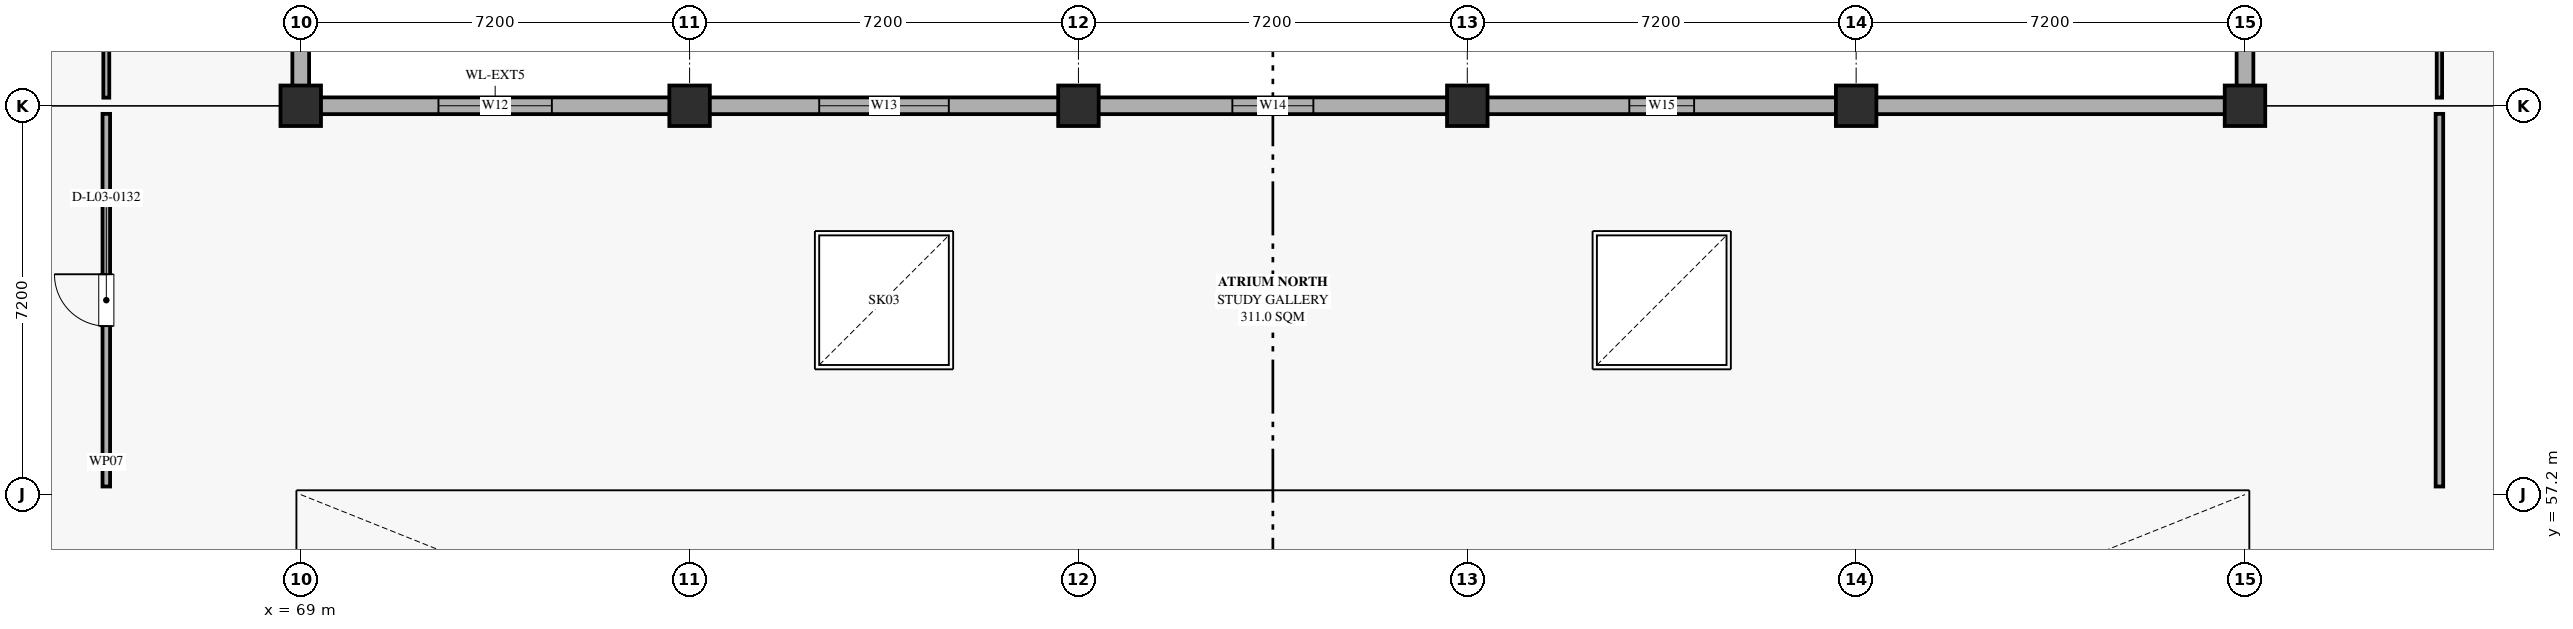
"""IFC4 building model, lengths in metres.
Left out: names, types, materials, properties, quantities, classifications, styles, units other than length and angle.
Written with IfcOpenShell. Run it as: python <this file> out.ifc"""

import sys

from ifc_helpers import new_model, si_unit, direction, frame, frame_2d, origin, origin_2d, place, context, subcontext, project, spatial, rectangle, extrude, element, fill, save


model = new_model("IFC4")
c1 = context("Model", 3, precision=1e-05, world=origin(), true_north=direction((0.0, 1.0)))
c2 = subcontext(c1, "Body", "Model", "MODEL_VIEW")
j1 = project(units=[si_unit("LENGTHUNIT", "METRE"), si_unit("PLANEANGLEUNIT", "RADIAN")], contexts=[c1])
p1 = place(None, origin())
s1 = spatial("IfcSite", under=j1, at=p1, CompositionType="ELEMENT")
p2 = place(p1, origin())
s2 = spatial("IfcBuilding", under=s1, at=p2, CompositionType="ELEMENT")
p3 = place(p2, frame((0.0, 0.0, 15.12)))
s3 = spatial("IfcBuildingStorey", under=s2, at=p3, CompositionType="ELEMENT", Elevation=15.12)
for number, where, z_axis, x_axis in (
    (1, (69.0, 64.4, 0.0), (0.0, 0.0, 1.0), (1.0, 0.0, 0.0)),
    (2, (76.2, 64.4, 0.0), (0.0, 0.0, 1.0), (1.0, 0.0, 0.0)),
    (3, (83.4, 64.4, 0.0), (0.0, 0.0, 1.0), (1.0, 0.0, 0.0)),
    (4, (90.6, 64.4, 0.0), (0.0, 0.0, 1.0), (1.0, 0.0, 0.0)),
    (5, (97.8, 64.4, 0.0), (0.0, 0.0, 1.0), (1.0, 0.0, 0.0)),
    (6, (105.0, 64.4, 0.0), (0.0, 0.0, 1.0), (1.0, 0.0, 0.0)),
):
    element("IfcColumn", number, at=place(p3, frame(where, z_axis=z_axis, x_axis=x_axis)), inside=s3, PredefinedType="COLUMN", context=c2, shape_type="SweptSolid", body=[
        extrude(rectangle(XDim=0.75, YDim=0.75, at=origin_2d()), origin(), (0.0, 0.0, 1.0), 4.68),
    ])
p4 = place(p3, frame((69.36, 64.4, 0.0), z_axis=(0.0, 0.0, 1.0), x_axis=(1.0, 0.0, 0.0)))
e7 = element("IfcWall", 7, at=p4, inside=s3, PredefinedType="SOLIDWALL", context=c2, shape_type="SweptSolid", body=[
    extrude(rectangle(XDim=6.48, YDim=0.31, at=frame_2d((3.24, 0.0))), origin(), (0.0, 0.0, 1.0), 3.18),
])
p5 = place(p4, frame((2.19, 0.0, 0.85)))
e8 = element("IfcOpeningElement", 8, at=p5, cuts=e7, PredefinedType="OPENING", context=c2, shape_type="SweptSolid", body=[
    extrude(rectangle(XDim=2.1, YDim=1.8, at=frame_2d((1.05, 0.9))), frame((0.0, 0.165, 0.0), z_axis=(0.0, -1.0, 0.0), x_axis=(1.0, 0.0, 0.0)), (0.0, 0.0, 1.0), 0.33),
])
p6 = place(p3, frame((76.56, 64.4, 0.0), z_axis=(0.0, 0.0, 1.0), x_axis=(1.0, 0.0, 0.0)))
e9 = element("IfcWall", 9, at=p6, inside=s3, PredefinedType="SOLIDWALL", context=c2, shape_type="SweptSolid", body=[
    extrude(rectangle(XDim=6.48, YDim=0.31, at=frame_2d((3.24, 0.0))), origin(), (0.0, 0.0, 1.0), 3.18),
])
p7 = place(p6, frame((2.04, 0.0, 0.85)))
e10 = element("IfcOpeningElement", 10, at=p7, cuts=e9, PredefinedType="OPENING", context=c2, shape_type="SweptSolid", body=[
    extrude(rectangle(XDim=2.4, YDim=1.8, at=frame_2d((1.2, 0.9))), frame((0.0, 0.165, 0.0), z_axis=(0.0, -1.0, 0.0), x_axis=(1.0, 0.0, 0.0)), (0.0, 0.0, 1.0), 0.33),
])
p8 = place(p3, frame((83.76, 64.4, 0.0), z_axis=(0.0, 0.0, 1.0), x_axis=(1.0, 0.0, 0.0)))
e11 = element("IfcWall", 11, at=p8, inside=s3, PredefinedType="SOLIDWALL", context=c2, shape_type="SweptSolid", body=[
    extrude(rectangle(XDim=6.48, YDim=0.31, at=frame_2d((3.24, 0.0))), origin(), (0.0, 0.0, 1.0), 3.18),
])
p9 = place(p8, frame((2.49, 0.0, 0.85)))
e12 = element("IfcOpeningElement", 12, at=p9, cuts=e11, PredefinedType="OPENING", context=c2, shape_type="SweptSolid", body=[
    extrude(rectangle(XDim=1.5, YDim=1.8, at=frame_2d((0.75, 0.9))), frame((0.0, 0.165, 0.0), z_axis=(0.0, -1.0, 0.0), x_axis=(1.0, 0.0, 0.0)), (0.0, 0.0, 1.0), 0.33),
])
p10 = place(p3, frame((90.96, 64.4, 0.0), z_axis=(0.0, 0.0, 1.0), x_axis=(1.0, 0.0, 0.0)))
e13 = element("IfcWall", 13, at=p10, inside=s3, PredefinedType="SOLIDWALL", context=c2, shape_type="SweptSolid", body=[
    extrude(rectangle(XDim=6.48, YDim=0.31, at=frame_2d((3.24, 0.0))), origin(), (0.0, 0.0, 1.0), 3.18),
])
p11 = place(p10, frame((2.64, 0.0, 0.85)))
e14 = element("IfcOpeningElement", 14, at=p11, cuts=e13, PredefinedType="OPENING", context=c2, shape_type="SweptSolid", body=[
    extrude(rectangle(XDim=1.2, YDim=1.8, at=frame_2d((0.6, 0.9))), frame((0.0, 0.165, 0.0), z_axis=(0.0, -1.0, 0.0), x_axis=(1.0, 0.0, 0.0)), (0.0, 0.0, 1.0), 0.33),
])
p12 = place(p3, frame((98.16, 64.4, 0.0), z_axis=(0.0, 0.0, 1.0), x_axis=(1.0, 0.0, 0.0)))
e15 = element("IfcWall", 15, at=p12, inside=s3, PredefinedType="SOLIDWALL", context=c2, shape_type="SweptSolid", body=[
    extrude(rectangle(XDim=6.48, YDim=0.31, at=frame_2d((3.24, 0.0))), origin(), (0.0, 0.0, 1.0), 3.18),
])
p13 = place(p3, frame((69.0, 71.24, 0.0), z_axis=(0.0, 0.0, 1.0), x_axis=(0.0, -1.0, 0.0)))
e16 = element("IfcWall", 16, at=p13, inside=s3, PredefinedType="SOLIDWALL", context=c2, shape_type="SweptSolid", body=[
    extrude(rectangle(XDim=6.48, YDim=0.31, at=frame_2d((3.24, 0.0))), origin(), (0.0, 0.0, 1.0), 3.18),
])
p14 = place(p13, frame((2.39, 0.0, 0.85)))
e17 = element("IfcOpeningElement", 17, at=p14, cuts=e16, PredefinedType="OPENING", context=c2, shape_type="SweptSolid", body=[
    extrude(rectangle(XDim=1.7, YDim=2.0, at=frame_2d((0.85, 1.0))), frame((0.0, 0.165, 0.0), z_axis=(0.0, -1.0, 0.0), x_axis=(1.0, 0.0, 0.0)), (0.0, 0.0, 1.0), 0.33),
])
p15 = place(p3, frame((105.0, 64.76, 0.0), z_axis=(0.0, 0.0, 1.0), x_axis=(0.0, 1.0, 0.0)))
e18 = element("IfcWall", 18, at=p15, inside=s3, PredefinedType="SOLIDWALL", context=c2, shape_type="SweptSolid", body=[
    extrude(rectangle(XDim=6.48, YDim=0.31, at=frame_2d((3.24, 0.0))), origin(), (0.0, 0.0, 1.0), 3.18),
])
p16 = place(p15, frame((2.29, 0.0, 0.85)))
e19 = element("IfcOpeningElement", 19, at=p16, cuts=e18, PredefinedType="OPENING", context=c2, shape_type="SweptSolid", body=[
    extrude(rectangle(XDim=1.9, YDim=2.0, at=frame_2d((0.95, 1.0))), frame((0.0, 0.165, 0.0), z_axis=(0.0, -1.0, 0.0), x_axis=(1.0, 0.0, 0.0)), (0.0, 0.0, 1.0), 0.33),
])
p17 = place(p3, frame((65.4, 57.35, 0.0), z_axis=(0.0, 0.0, 1.0), x_axis=(0.0, 1.0, 0.0)))
e20 = element("IfcWall", 20, at=p17, inside=s3, PredefinedType="PARTITIONING", context=c2, shape_type="SweptSolid", body=[
    extrude(rectangle(XDim=6.9, YDim=0.14, at=frame_2d((3.45, 0.0))), origin(), (0.0, 0.0, 1.0), 3.16),
])
p18 = place(p17, frame((2.97, 0.0, 0.0)))
e21 = element("IfcOpeningElement", 21, at=p18, cuts=e20, PredefinedType="OPENING", context=c2, shape_type="SweptSolid", body=[
    extrude(rectangle(XDim=0.96, YDim=2.1, at=frame_2d((0.48, 1.05))), frame((0.0, 0.08, 0.0), z_axis=(0.0, -1.0, 0.0), x_axis=(1.0, 0.0, 0.0)), (0.0, 0.0, 1.0), 0.16),
])
p19 = place(p3, frame((108.6, 64.25, 0.0), z_axis=(0.0, 0.0, 1.0), x_axis=(0.0, -1.0, 0.0)))
e22 = element("IfcWall", 22, at=p19, inside=s3, PredefinedType="PARTITIONING", context=c2, shape_type="SweptSolid", body=[
    extrude(rectangle(XDim=6.9, YDim=0.14, at=frame_2d((3.45, 0.0))), origin(), (0.0, 0.0, 1.0), 3.16),
])
p20 = place(p3, frame((65.4, 64.55, 0.0), z_axis=(0.0, 0.0, 1.0), x_axis=(0.0, 1.0, 0.0)))
e23 = element("IfcWall", 23, at=p20, inside=s3, PredefinedType="PARTITIONING", context=c2, shape_type="SweptSolid", body=[
    extrude(rectangle(XDim=21.3, YDim=0.11, at=frame_2d((10.65, 0.0))), origin(), (0.0, 0.0, 1.0), 3.16),
])
p21 = place(p20, frame((10.17, 0.0, 0.0)))
e24 = element("IfcOpeningElement", 24, at=p21, cuts=e23, PredefinedType="OPENING", context=c2, shape_type="SweptSolid", body=[
    extrude(rectangle(XDim=0.96, YDim=2.16, at=frame_2d((0.48, 1.08))), frame((0.0, 0.065, 0.0), z_axis=(0.0, -1.0, 0.0), x_axis=(1.0, 0.0, 0.0)), (0.0, 0.0, 1.0), 0.13),
])
p22 = place(p3, frame((108.6, 85.85, 0.0), z_axis=(0.0, 0.0, 1.0), x_axis=(0.0, -1.0, 0.0)))
e25 = element("IfcWall", 25, at=p22, inside=s3, PredefinedType="PARTITIONING", context=c2, shape_type="SweptSolid", body=[
    extrude(rectangle(XDim=21.3, YDim=0.1, at=frame_2d((10.65, 0.0))), origin(), (0.0, 0.0, 1.0), 3.16),
])
p23 = place(p22, frame((10.17, 0.0, 0.0)))
e26 = element("IfcOpeningElement", 26, at=p23, cuts=e25, PredefinedType="OPENING", context=c2, shape_type="SweptSolid", body=[
    extrude(rectangle(XDim=0.96, YDim=2.22, at=frame_2d((0.48, 1.11))), frame((0.0, 0.06, 0.0), z_axis=(0.0, -1.0, 0.0), x_axis=(1.0, 0.0, 0.0)), (0.0, 0.0, 1.0), 0.12),
])
p24 = place(p5, origin())
e27 = element("IfcWindow", 27, at=p24, inside=s3, PartitioningType="DOUBLE_PANEL_VERTICAL", PredefinedType="WINDOW", context=c2, shape_type="SweptSolid", body=[
    extrude(rectangle(XDim=2.1, YDim=1.8, at=frame_2d((1.05, 0.9))), frame((0.0, 0.03, 0.0), z_axis=(0.0, -1.0, 0.0), x_axis=(1.0, 0.0, 0.0)), (0.0, 0.0, 1.0), 0.06),
])
fill(e8, e27)
p25 = place(p7, origin())
e28 = element("IfcWindow", 28, at=p25, inside=s3, PartitioningType="DOUBLE_PANEL_VERTICAL", PredefinedType="WINDOW", context=c2, shape_type="SweptSolid", body=[
    extrude(rectangle(XDim=2.4, YDim=1.8, at=frame_2d((1.2, 0.9))), frame((0.0, 0.03, 0.0), z_axis=(0.0, -1.0, 0.0), x_axis=(1.0, 0.0, 0.0)), (0.0, 0.0, 1.0), 0.06),
])
fill(e10, e28)
p26 = place(p9, origin())
e29 = element("IfcWindow", 29, at=p26, inside=s3, PartitioningType="SINGLE_PANEL", PredefinedType="WINDOW", context=c2, shape_type="SweptSolid", body=[
    extrude(rectangle(XDim=1.5, YDim=1.8, at=frame_2d((0.75, 0.9))), frame((0.0, 0.03, 0.0), z_axis=(0.0, -1.0, 0.0), x_axis=(1.0, 0.0, 0.0)), (0.0, 0.0, 1.0), 0.06),
])
fill(e12, e29)
p27 = place(p11, origin())
e30 = element("IfcWindow", 30, at=p27, inside=s3, PartitioningType="SINGLE_PANEL", PredefinedType="WINDOW", context=c2, shape_type="SweptSolid", body=[
    extrude(rectangle(XDim=1.2, YDim=1.8, at=frame_2d((0.6, 0.9))), frame((0.0, 0.03, 0.0), z_axis=(0.0, -1.0, 0.0), x_axis=(1.0, 0.0, 0.0)), (0.0, 0.0, 1.0), 0.06),
])
fill(e14, e30)
p28 = place(p3, frame((0.0, 0.0, -0.25)))
p29 = place(p28, frame((79.8, 60.8, 0.0)))
p30 = place(p29, frame((0.0, 0.0, 0.2)))
e31 = element("IfcWindow", 31, at=p30, inside=s3, PartitioningType="SINGLE_PANEL", PredefinedType="SKYLIGHT", context=c2, shape_type="SweptSolid", body=[
    extrude(rectangle(XDim=2.4, YDim=2.4, at=origin_2d()), origin(), (0.0, 0.0, 1.0), 0.05),
])
p31 = place(p28, frame((94.2, 60.8, 0.0)))
p32 = place(p31, frame((0.0, 0.0, 0.2)))
e32 = element("IfcWindow", 32, at=p32, inside=s3, PartitioningType="SINGLE_PANEL", PredefinedType="SKYLIGHT", context=c2, shape_type="SweptSolid", body=[
    extrude(rectangle(XDim=2.4, YDim=2.4, at=origin_2d()), origin(), (0.0, 0.0, 1.0), 0.05),
])
p33 = place(p18, origin())
e33 = element("IfcDoor", 33, at=p33, inside=s3, OperationType="SINGLE_SWING_RIGHT", PredefinedType="DOOR", context=c2, shape_type="SweptSolid", body=[
    extrude(rectangle(XDim=0.96, YDim=2.1, at=frame_2d((0.48, 1.05))), frame((0.0, 0.025, 0.0), z_axis=(0.0, -1.0, 0.0), x_axis=(1.0, 0.0, 0.0)), (0.0, 0.0, 1.0), 0.05),
])
fill(e21, e33)
save(model, sys.argv[1])
